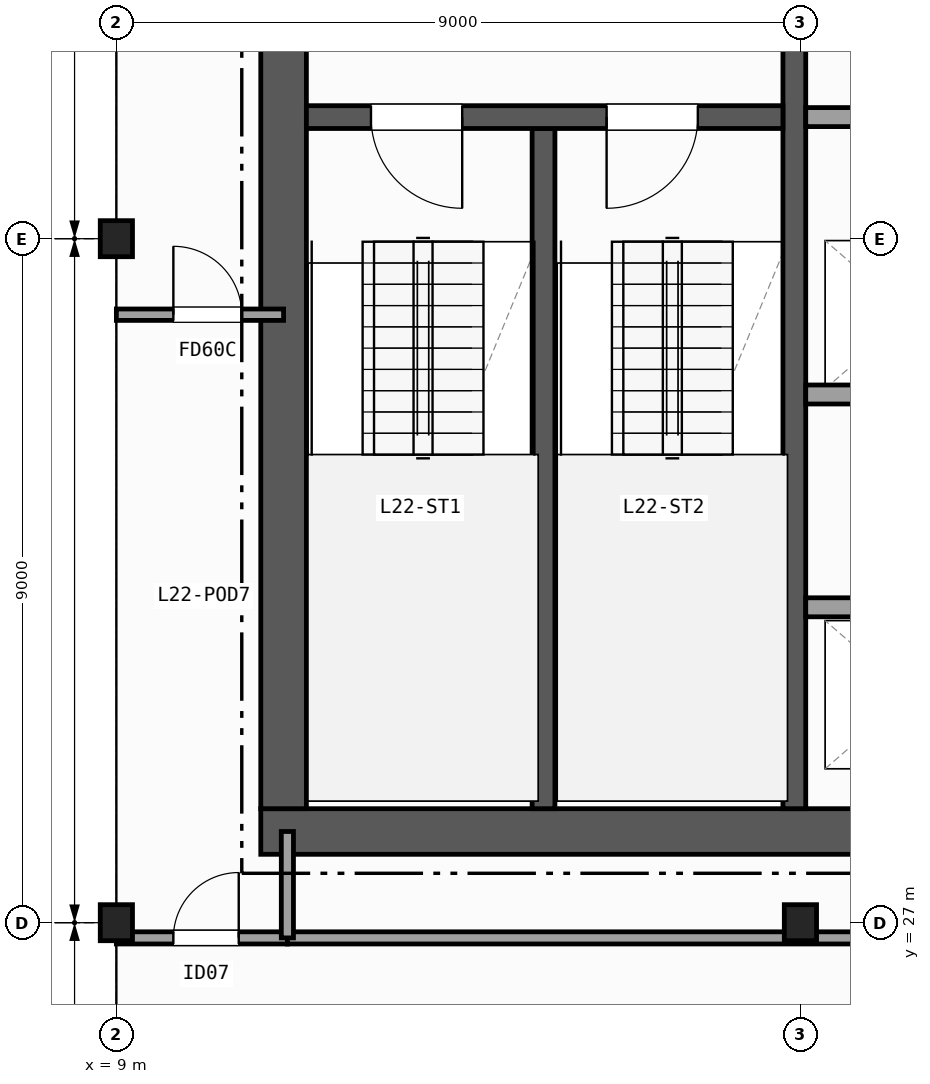
"""IFC4 building model, lengths in metres.
Left out: names, types, materials, properties, quantities, classifications, styles, units other than length and angle.
Written with IfcOpenShell. Run it as: python <this file> out.ifc"""

import sys

from ifc_helpers import new_model, si_unit, direction, frame, frame_2d, origin, origin_2d, place, context, subcontext, project, spatial, rectangle, i_section, extrude, element, fill, save


model = new_model("IFC4")
c1 = context("Model", 3, precision=1e-05, world=origin(), true_north=direction((0.0, 1.0)))
c2 = subcontext(c1, "Body", "Model", "MODEL_VIEW")
j1 = project(units=[si_unit("LENGTHUNIT", "METRE"), si_unit("PLANEANGLEUNIT", "RADIAN")], contexts=[c1])
p1 = place(None, origin())
s1 = spatial("IfcSite", under=j1, at=p1, CompositionType="ELEMENT")
p2 = place(p1, origin())
s2 = spatial("IfcBuilding", under=s1, at=p2, CompositionType="ELEMENT")
p3 = place(p2, frame((0.0, 0.0, 92.8)))
s3 = spatial("IfcBuildingStorey", under=s2, at=p3, CompositionType="ELEMENT", Elevation=92.8)
for number, where, z_axis, x_axis in (
    (1, (9.0, 27.0, 0.0), (0.0, 0.0, 1.0), (1.0, 0.0, 0.0)),
    (2, (9.0, 36.0, 0.0), (0.0, 0.0, 1.0), (1.0, 0.0, 0.0)),
    (3, (18.0, 27.0, 0.0), (0.0, 0.0, 1.0), (1.0, 0.0, 0.0)),
):
    element("IfcColumn", number, at=place(p3, frame(where, z_axis=z_axis, x_axis=x_axis)), inside=s3, PredefinedType="COLUMN", context=c2, shape_type="SweptSolid", body=[
        extrude(i_section(OverallWidth=0.424, OverallDepth=0.474, WebThickness=0.048, FlangeThickness=0.077, FilletRadius=0.015, at=origin_2d()), origin(), (0.0, 0.0, 1.0), 3.7),
    ])
p4 = place(p3, frame((10.9, 28.2, 0.0), z_axis=(0.0, 0.0, 1.0), x_axis=(1.0, 0.0, 0.0)))
e4 = element("IfcWall", 4, at=p4, inside=s3, PredefinedType="SHEAR", context=c2, shape_type="SweptSolid", body=[
    extrude(rectangle(XDim=14.0, YDim=0.6, at=frame_2d((7.0, 0.0))), origin(), (0.0, 0.0, 1.0), 3.42),
])
p5 = place(p3, frame((11.2, 42.1, 0.0), z_axis=(0.0, 0.0, 1.0), x_axis=(0.0, -1.0, 0.0)))
e5 = element("IfcWall", 5, at=p5, inside=s3, PredefinedType="SHEAR", context=c2, shape_type="SweptSolid", body=[
    extrude(rectangle(XDim=13.6, YDim=0.6, at=frame_2d((6.8, 0.0))), origin(), (0.0, 0.0, 1.0), 3.42),
])
p6 = place(p3, frame((14.62, 28.5, 0.0), z_axis=(0.0, 0.0, 1.0), x_axis=(0.0, 1.0, 0.0)))
e6 = element("IfcWall", 6, at=p6, inside=s3, PredefinedType="SHEAR", context=c2, shape_type="SweptSolid", body=[
    extrude(rectangle(XDim=8.95, YDim=0.3, at=frame_2d((4.475, 0.0))), origin(), (0.0, 0.0, 1.0), 3.42),
])
p7 = place(p3, frame((17.92, 42.1, 0.0), z_axis=(0.0, 0.0, 1.0), x_axis=(0.0, -1.0, 0.0)))
e7 = element("IfcWall", 7, at=p7, inside=s3, PredefinedType="SHEAR", context=c2, shape_type="SweptSolid", body=[
    extrude(rectangle(XDim=13.6, YDim=0.3, at=frame_2d((6.8, 0.0))), origin(), (0.0, 0.0, 1.0), 3.42),
])
p8 = place(p7, frame((1.925, 0.0, 0.0)))
e8 = element("IfcOpeningElement", 8, at=p8, cuts=e7, PredefinedType="OPENING", context=c2, shape_type="SweptSolid", body=[
    extrude(rectangle(XDim=1.15, YDim=2.15, at=frame_2d((0.575, 1.075))), frame((0.0, 0.16, 0.0), z_axis=(0.0, -1.0, 0.0), x_axis=(1.0, 0.0, 0.0)), (0.0, 0.0, 1.0), 0.32),
])
p9 = place(p3, frame((17.77, 37.6, 0.0), z_axis=(0.0, 0.0, 1.0), x_axis=(-1.0, 0.0, 0.0)))
e9 = element("IfcWall", 9, at=p9, inside=s3, PredefinedType="SHEAR", context=c2, shape_type="SweptSolid", body=[
    extrude(rectangle(XDim=6.27, YDim=0.3, at=frame_2d((3.135, 0.0))), origin(), (0.0, 0.0, 1.0), 3.42),
])
p10 = place(p9, frame((4.22, 0.0, 0.0)))
e10 = element("IfcOpeningElement", 10, at=p10, cuts=e9, PredefinedType="OPENING", context=c2, shape_type="SweptSolid", body=[
    extrude(rectangle(XDim=1.2, YDim=2.15, at=frame_2d((0.6, 1.075))), frame((0.0, 0.16, 0.0), z_axis=(0.0, -1.0, 0.0), x_axis=(1.0, 0.0, 0.0)), (0.0, 0.0, 1.0), 0.32),
])
p11 = place(p9, frame((1.12, 0.0, 0.0)))
e11 = element("IfcOpeningElement", 11, at=p11, cuts=e9, PredefinedType="OPENING", context=c2, shape_type="SweptSolid", body=[
    extrude(rectangle(XDim=1.2, YDim=2.15, at=frame_2d((0.6, 1.075))), frame((0.0, 0.16, 0.0), z_axis=(0.0, -1.0, 0.0), x_axis=(1.0, 0.0, 0.0)), (0.0, 0.0, 1.0), 0.32),
])
for number, where, z_axis, x_axis in (
    (12, (18.07, 37.6, 0.0), (0.0, 0.0, 1.0), (1.0, 0.0, 0.0)),
    (13, (18.07, 31.15, 0.0), (0.0, 0.0, 1.0), (1.0, 0.0, 0.0)),
    (14, (24.3, 33.95, 0.0), (0.0, 0.0, 1.0), (-1.0, 0.0, 0.0)),
):
    element("IfcWall", number, at=place(p3, frame(where, z_axis=z_axis, x_axis=x_axis)), inside=s3, PredefinedType="PARTITIONING", context=c2, shape_type="SweptSolid", body=[
        extrude(rectangle(XDim=6.23, YDim=0.25, at=frame_2d((3.115, 0.0))), origin(), (0.0, 0.0, 1.0), 3.42),
    ])
p12 = place(p3, frame((9.0, 26.8, 0.0), z_axis=(0.0, 0.0, 1.0), x_axis=(1.0, 0.0, 0.0)))
e15 = element("IfcWall", 15, at=p12, inside=s3, PredefinedType="PARTITIONING", context=c2, shape_type="SweptSolid", body=[
    extrude(rectangle(XDim=2.25, YDim=0.16, at=frame_2d((1.125, 0.0))), origin(), (0.0, 0.0, 1.0), 2.627),
])
p13 = place(p12, frame((0.75, 0.0, 0.0)))
e16 = element("IfcOpeningElement", 16, at=p13, cuts=e15, PredefinedType="OPENING", context=c2, shape_type="SweptSolid", body=[
    extrude(rectangle(XDim=0.86, YDim=2.05, at=frame_2d((0.43, 1.025))), frame((0.0, 0.09, 0.0), z_axis=(0.0, -1.0, 0.0), x_axis=(1.0, 0.0, 0.0)), (0.0, 0.0, 1.0), 0.18),
])
p14 = place(p3, frame((9.0, 35.0, 0.0), z_axis=(0.0, 0.0, 1.0), x_axis=(1.0, 0.0, 0.0)))
e17 = element("IfcWall", 17, at=p14, inside=s3, PredefinedType="PARTITIONING", context=c2, shape_type="SweptSolid", body=[
    extrude(rectangle(XDim=2.2, YDim=0.15, at=frame_2d((1.1, 0.0))), origin(), (0.0, 0.0, 1.0), 2.627),
])
p15 = place(p14, frame((0.75, 0.0, 0.0)))
e18 = element("IfcOpeningElement", 18, at=p15, cuts=e17, PredefinedType="OPENING", context=c2, shape_type="SweptSolid", body=[
    extrude(rectangle(XDim=0.9, YDim=2.1, at=frame_2d((0.45, 1.05))), frame((0.0, 0.085, 0.0), z_axis=(0.0, -1.0, 0.0), x_axis=(1.0, 0.0, 0.0)), (0.0, 0.0, 1.0), 0.17),
])
p16 = place(p3, frame((11.25, 26.8, 0.0), z_axis=(0.0, 0.0, 1.0), x_axis=(1.0, 0.0, 0.0)))
e19 = element("IfcWall", 19, at=p16, inside=s3, PredefinedType="PARTITIONING", context=c2, shape_type="SweptSolid", body=[
    extrude(rectangle(XDim=13.4, YDim=0.16, at=frame_2d((6.7, 0.0))), origin(), (0.0, 0.0, 1.0), 2.789),
])
p17 = place(p16, frame((9.5, 0.0, 0.0)))
e20 = element("IfcOpeningElement", 20, at=p17, cuts=e19, PredefinedType="OPENING", context=c2, shape_type="SweptSolid", body=[
    extrude(rectangle(XDim=1.0, YDim=2.1, at=frame_2d((0.5, 1.05))), frame((0.0, 0.09, 0.0), z_axis=(0.0, -1.0, 0.0), x_axis=(1.0, 0.0, 0.0)), (0.0, 0.0, 1.0), 0.18),
])
p18 = place(p3, frame((11.25, 26.8, 0.0), z_axis=(0.0, 0.0, 1.0), x_axis=(0.0, 1.0, 0.0)))
e21 = element("IfcWall", 21, at=p18, inside=s3, PredefinedType="PARTITIONING", context=c2, shape_type="SweptSolid", body=[
    extrude(rectangle(XDim=1.4, YDim=0.16, at=frame_2d((0.7, 0.0))), origin(), (0.0, 0.0, 1.0), 2.789),
])
p19 = place(p10, origin())
e22 = element("IfcDoor", 22, at=p19, inside=s3, OperationType="SINGLE_SWING_LEFT", PredefinedType="DOOR", context=c2, shape_type="SweptSolid", body=[
    extrude(rectangle(XDim=1.2, YDim=2.15, at=frame_2d((0.6, 1.075))), frame((0.0, 0.025, 0.0), z_axis=(0.0, -1.0, 0.0), x_axis=(1.0, 0.0, 0.0)), (0.0, 0.0, 1.0), 0.05),
])
fill(e10, e22)
p20 = place(p11, origin())
e23 = element("IfcDoor", 23, at=p20, inside=s3, OperationType="SINGLE_SWING_RIGHT", PredefinedType="DOOR", context=c2, shape_type="SweptSolid", body=[
    extrude(rectangle(XDim=1.2, YDim=2.15, at=frame_2d((0.6, 1.075))), frame((0.0, 0.025, 0.0), z_axis=(0.0, -1.0, 0.0), x_axis=(1.0, 0.0, 0.0)), (0.0, 0.0, 1.0), 0.05),
])
fill(e11, e23)
p21 = place(p13, origin())
e24 = element("IfcDoor", 24, at=p21, inside=s3, OperationType="SINGLE_SWING_RIGHT", PredefinedType="DOOR", context=c2, shape_type="SweptSolid", body=[
    extrude(rectangle(XDim=0.86, YDim=2.05, at=frame_2d((0.43, 1.025))), frame((0.0, 0.025, 0.0), z_axis=(0.0, -1.0, 0.0), x_axis=(1.0, 0.0, 0.0)), (0.0, 0.0, 1.0), 0.05),
])
fill(e16, e24)
p22 = place(p15, origin())
e25 = element("IfcDoor", 25, at=p22, inside=s3, OperationType="SINGLE_SWING_LEFT", PredefinedType="DOOR", context=c2, shape_type="SweptSolid", body=[
    extrude(rectangle(XDim=0.9, YDim=2.1, at=frame_2d((0.45, 1.05))), frame((0.0, 0.025, 0.0), z_axis=(0.0, -1.0, 0.0), x_axis=(1.0, 0.0, 0.0)), (0.0, 0.0, 1.0), 0.05),
])
fill(e18, e25)
save(model, sys.argv[1])
